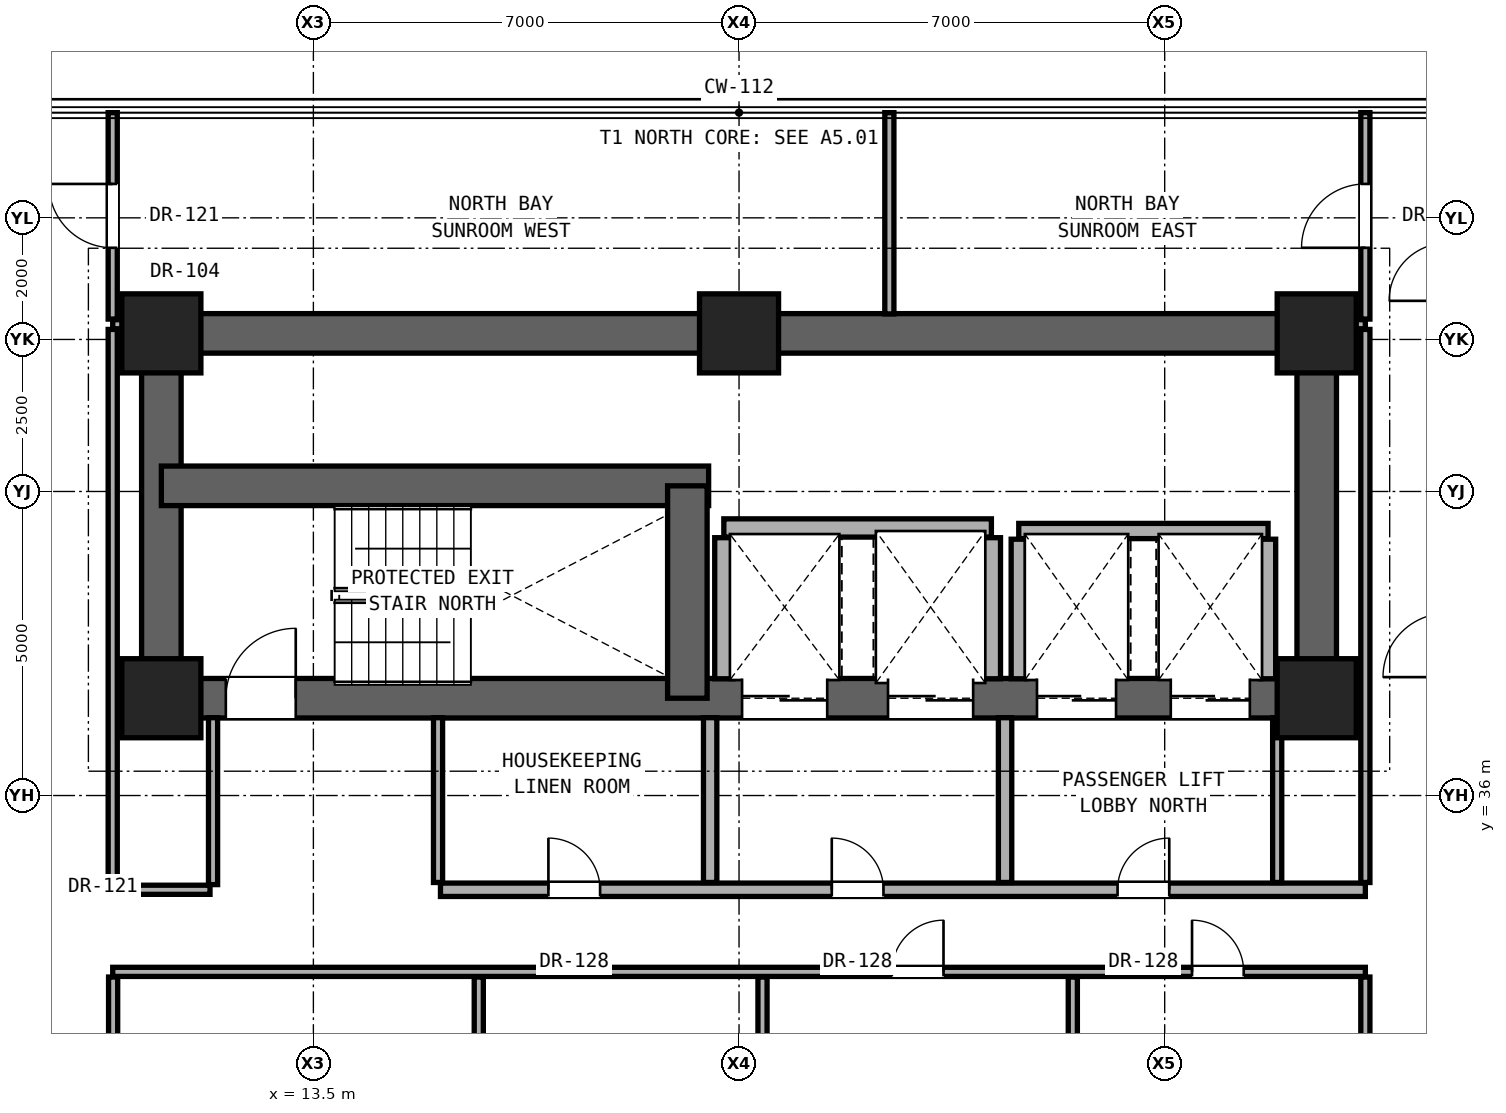
"""IFC4 building model, lengths in metres.
Left out: names, types, materials, properties, quantities, classifications, styles, units other than length and angle.
Written with IfcOpenShell. Run it as: python <this file> out.ifc"""

import sys

from ifc_helpers import new_model, si_unit, direction, frame, frame_2d, origin, origin_2d, place, context, subcontext, project, spatial, rectangle, extrude, element, fill, save


model = new_model("IFC4")
c1 = context("Model", 3, precision=1e-05, world=origin(), true_north=direction((0.0, 1.0)))
c2 = subcontext(c1, "Body", "Model", "MODEL_VIEW")
j1 = project(units=[si_unit("LENGTHUNIT", "METRE"), si_unit("PLANEANGLEUNIT", "RADIAN")], contexts=[c1])
p1 = place(None, origin())
s1 = spatial("IfcSite", under=j1, at=p1, CompositionType="ELEMENT")
p2 = place(p1, origin())
s2 = spatial("IfcBuilding", under=s1, at=p2, CompositionType="ELEMENT")
p3 = place(p2, frame((0.0, 0.0, 68.6)))
s3 = spatial("IfcBuildingStorey", under=s2, at=p3, CompositionType="ELEMENT", Elevation=68.6)
for number, where, z_axis, x_axis in (
    (1, (11.0, 37.6, 0.0), (0.0, 0.0, 1.0), (1.0, 0.0, 0.0)),
    (2, (30.0, 37.6, 0.0), (0.0, 0.0, 1.0), (1.0, 0.0, 0.0)),
    (3, (11.0, 43.6, 0.0), (0.0, 0.0, 1.0), (1.0, 0.0, 0.0)),
    (4, (20.5, 43.6, 0.0), (0.0, 0.0, 1.0), (1.0, 0.0, 0.0)),
    (5, (30.0, 43.6, 0.0), (0.0, 0.0, 1.0), (1.0, 0.0, 0.0)),
):
    element("IfcColumn", number, at=place(p3, frame(where, z_axis=z_axis, x_axis=x_axis)), inside=s3, PredefinedType="COLUMN", context=c2, shape_type="SweptSolid", body=[
        extrude(rectangle(XDim=1.3, YDim=1.3, at=origin_2d()), origin(), (0.0, 0.0, 1.0), 3.3),
    ])
p4 = place(p3, frame((11.0, 43.6, 0.0), z_axis=(0.0, 0.0, 1.0), x_axis=(1.0, 0.0, 0.0)))
e6 = element("IfcWall", 6, at=p4, inside=s3, PredefinedType="SHEAR", context=c2, shape_type="SweptSolid", body=[
    extrude(rectangle(XDim=19.0, YDim=0.65, at=frame_2d((9.5, 0.0))), origin(), (0.0, 0.0, 1.0), 3.06),
])
for number, where, z_axis, x_axis in (
    (7, (11.0, 37.6, 0.0), (0.0, 0.0, 1.0), (0.0, 1.0, 0.0)),
    (8, (30.0, 37.6, 0.0), (0.0, 0.0, 1.0), (0.0, 1.0, 0.0)),
):
    element("IfcWall", number, at=place(p3, frame(where, z_axis=z_axis, x_axis=x_axis)), inside=s3, PredefinedType="SHEAR", context=c2, shape_type="SweptSolid", body=[
        extrude(rectangle(XDim=6.0, YDim=0.65, at=frame_2d((3.0, 0.0))), origin(), (0.0, 0.0, 1.0), 3.06),
    ])
p5 = place(p3, frame((11.0, 37.6, 0.0), z_axis=(0.0, 0.0, 1.0), x_axis=(1.0, 0.0, 0.0)))
e9 = element("IfcWall", 9, at=p5, inside=s3, PredefinedType="SHEAR", context=c2, shape_type="SweptSolid", body=[
    extrude(rectangle(XDim=19.0, YDim=0.65, at=frame_2d((9.5, 0.0))), origin(), (0.0, 0.0, 1.0), 3.06),
])
p6 = place(p5, frame((1.06, 0.0, 0.0)))
e10 = element("IfcOpeningElement", 10, at=p6, cuts=e9, PredefinedType="OPENING", context=c2, shape_type="SweptSolid", body=[
    extrude(rectangle(XDim=1.15, YDim=2.2, at=frame_2d((0.575, 1.1))), frame((0.0, 0.335, 0.0), z_axis=(0.0, -1.0, 0.0), x_axis=(1.0, 0.0, 0.0)), (0.0, 0.0, 1.0), 0.67),
])
p7 = place(p5, frame((9.55, 0.0, 0.0)))
e11 = element("IfcOpeningElement", 11, at=p7, cuts=e9, PredefinedType="OPENING", context=c2, shape_type="SweptSolid", body=[
    extrude(rectangle(XDim=1.4, YDim=2.35, at=frame_2d((0.7, 1.175))), frame((0.0, 0.335, 0.0), z_axis=(0.0, -1.0, 0.0), x_axis=(1.0, 0.0, 0.0)), (0.0, 0.0, 1.0), 0.67),
])
p8 = place(p5, frame((11.95, 0.0, 0.0)))
e12 = element("IfcOpeningElement", 12, at=p8, cuts=e9, PredefinedType="OPENING", context=c2, shape_type="SweptSolid", body=[
    extrude(rectangle(XDim=1.4, YDim=2.35, at=frame_2d((0.7, 1.175))), frame((0.0, 0.335, 0.0), z_axis=(0.0, -1.0, 0.0), x_axis=(1.0, 0.0, 0.0)), (0.0, 0.0, 1.0), 0.67),
])
p9 = place(p5, frame((14.4, 0.0, 0.0)))
e13 = element("IfcOpeningElement", 13, at=p9, cuts=e9, PredefinedType="OPENING", context=c2, shape_type="SweptSolid", body=[
    extrude(rectangle(XDim=1.3, YDim=2.3, at=frame_2d((0.65, 1.15))), frame((0.0, 0.335, 0.0), z_axis=(0.0, -1.0, 0.0), x_axis=(1.0, 0.0, 0.0)), (0.0, 0.0, 1.0), 0.67),
])
p10 = place(p5, frame((16.6, 0.0, 0.0)))
e14 = element("IfcOpeningElement", 14, at=p10, cuts=e9, PredefinedType="OPENING", context=c2, shape_type="SweptSolid", body=[
    extrude(rectangle(XDim=1.3, YDim=2.3, at=frame_2d((0.65, 1.15))), frame((0.0, 0.335, 0.0), z_axis=(0.0, -1.0, 0.0), x_axis=(1.0, 0.0, 0.0)), (0.0, 0.0, 1.0), 0.67),
])
p11 = place(p3, frame((11.0, 41.093, 0.0), z_axis=(0.0, 0.0, 1.0), x_axis=(1.0, 0.0, 0.0)))
e15 = element("IfcWall", 15, at=p11, inside=s3, PredefinedType="SHEAR", context=c2, shape_type="SweptSolid", body=[
    extrude(rectangle(XDim=9.0, YDim=0.65, at=frame_2d((4.5, 0.0))), origin(), (0.0, 0.0, 1.0), 3.06),
])
p12 = place(p3, frame((19.65, 37.6, 0.0), z_axis=(0.0, 0.0, 1.0), x_axis=(0.0, 1.0, 0.0)))
e16 = element("IfcWall", 16, at=p12, inside=s3, PredefinedType="SHEAR", context=c2, shape_type="SweptSolid", body=[
    extrude(rectangle(XDim=3.493, YDim=0.65, at=frame_2d((1.747, 0.0))), origin(), (0.0, 0.0, 1.0), 3.06),
])
p13 = place(p3, frame((10.2, 33.1, 0.0), z_axis=(0.0, 0.0, 1.0), x_axis=(1.0, 0.0, 0.0)))
e17 = element("IfcWall", 17, at=p13, inside=s3, PredefinedType="PARTITIONING", context=c2, shape_type="SweptSolid", body=[
    extrude(rectangle(XDim=20.6, YDim=0.15, at=frame_2d((10.3, 0.0))), origin(), (0.0, 0.0, 1.0), 2.104),
])
p14 = place(p13, frame((12.812, 0.0, 0.0)))
e18 = element("IfcOpeningElement", 18, at=p14, cuts=e17, PredefinedType="OPENING", context=c2, shape_type="SweptSolid", body=[
    extrude(rectangle(XDim=0.85, YDim=2.01, at=frame_2d((0.425, 1.005))), frame((0.0, 0.085, 0.0), z_axis=(0.0, -1.0, 0.0), x_axis=(1.0, 0.0, 0.0)), (0.0, 0.0, 1.0), 0.17),
])
p15 = place(p13, frame((17.75, 0.0, 0.0)))
e19 = element("IfcOpeningElement", 19, at=p15, cuts=e17, PredefinedType="OPENING", context=c2, shape_type="SweptSolid", body=[
    extrude(rectangle(XDim=0.85, YDim=2.01, at=frame_2d((0.425, 1.005))), frame((0.0, 0.085, 0.0), z_axis=(0.0, -1.0, 0.0), x_axis=(1.0, 0.0, 0.0)), (0.0, 0.0, 1.0), 0.17),
])
p16 = place(p3, frame((10.2, 34.45, 0.0), z_axis=(0.0, 0.0, 1.0), x_axis=(1.0, 0.0, 0.0)))
e20 = element("IfcWall", 20, at=p16, inside=s3, PredefinedType="PARTITIONING", context=c2, shape_type="SweptSolid", body=[
    extrude(rectangle(XDim=1.6, YDim=0.15, at=frame_2d((0.8, 0.0))), origin(), (0.0, 0.0, 1.0), 2.104),
])
p17 = place(p3, frame((15.59, 34.45, 0.0), z_axis=(0.0, 0.0, 1.0), x_axis=(1.0, 0.0, 0.0)))
e21 = element("IfcWall", 21, at=p17, inside=s3, PredefinedType="SOLIDWALL", context=c2, shape_type="SweptSolid", body=[
    extrude(rectangle(XDim=15.21, YDim=0.22, at=frame_2d((7.605, 0.0))), origin(), (0.0, 0.0, 1.0), 2.104),
])
p18 = place(p17, frame((6.435, 0.0, 0.0)))
e22 = element("IfcOpeningElement", 22, at=p18, cuts=e21, PredefinedType="OPENING", context=c2, shape_type="SweptSolid", body=[
    extrude(rectangle(XDim=0.85, YDim=2.01, at=frame_2d((0.425, 1.005))), frame((0.0, 0.12, 0.0), z_axis=(0.0, -1.0, 0.0), x_axis=(1.0, 0.0, 0.0)), (0.0, 0.0, 1.0), 0.24),
])
p19 = place(p17, frame((11.135, 0.0, 0.0)))
e23 = element("IfcOpeningElement", 23, at=p19, cuts=e21, PredefinedType="OPENING", context=c2, shape_type="SweptSolid", body=[
    extrude(rectangle(XDim=0.85, YDim=2.01, at=frame_2d((0.425, 1.005))), frame((0.0, 0.12, 0.0), z_axis=(0.0, -1.0, 0.0), x_axis=(1.0, 0.0, 0.0)), (0.0, 0.0, 1.0), 0.24),
])
p20 = place(p17, frame((1.775, 0.0, 0.0)))
e24 = element("IfcOpeningElement", 24, at=p20, cuts=e21, PredefinedType="OPENING", context=c2, shape_type="SweptSolid", body=[
    extrude(rectangle(XDim=0.85, YDim=2.01, at=frame_2d((0.425, 1.005))), frame((0.0, 0.12, 0.0), z_axis=(0.0, -1.0, 0.0), x_axis=(1.0, 0.0, 0.0)), (0.0, 0.0, 1.0), 0.24),
])
p21 = place(p3, frame((25.1, 40.35, 0.0), z_axis=(0.0, 0.0, 1.0), x_axis=(1.0, 0.0, 0.0)))
e25 = element("IfcWall", 25, at=p21, inside=s3, PredefinedType="SOLIDWALL", context=c2, shape_type="SweptSolid", body=[
    extrude(rectangle(XDim=4.1, YDim=0.25, at=frame_2d((2.05, 0.0))), origin(), (0.0, 0.0, 1.0), 3.06),
])
p22 = place(p3, frame((20.25, 40.4, 0.0), z_axis=(0.0, 0.0, 1.0), x_axis=(1.0, 0.0, 0.0)))
e26 = element("IfcWall", 26, at=p22, inside=s3, PredefinedType="SOLIDWALL", context=c2, shape_type="SweptSolid", body=[
    extrude(rectangle(XDim=4.4, YDim=0.3, at=frame_2d((2.2, 0.0))), origin(), (0.0, 0.0, 1.0), 3.06),
])
for number, where, z_axis, x_axis in (
    (27, (10.2, 43.75, 0.0), (0.0, 0.0, 1.0), (1.0, 0.0, 0.0)),
    (28, (30.32, 43.75, 0.0), (0.0, 0.0, 1.0), (1.0, 0.0, 0.0)),
):
    element("IfcWall", number, at=place(p3, frame(where, z_axis=z_axis, x_axis=x_axis)), inside=s3, PredefinedType="PARTITIONING", context=c2, shape_type="SweptSolid", body=[
        extrude(rectangle(XDim=0.48, YDim=0.15, at=frame_2d((0.24, 0.0))), origin(), (0.0, 0.0, 1.0), 3.06),
    ])
p23 = place(p3, frame((10.207, 22.935, 0.0), z_axis=(0.0, 0.0, 1.0), x_axis=(0.0, 1.0, 0.0)))
e29 = element("IfcWall", 29, at=p23, inside=s3, PredefinedType="PARTITIONING", context=c2, shape_type="SweptSolid", body=[
    extrude(rectangle(XDim=10.08, YDim=0.15, at=frame_2d((5.04, 0.0))), origin(), (0.0, 0.0, 1.0), 2.279),
])
p24 = place(p23, frame((4.565, 0.0, 0.0)))
e30 = element("IfcOpeningElement", 30, at=p24, cuts=e29, PredefinedType="OPENING", context=c2, shape_type="SweptSolid", body=[
    extrude(rectangle(XDim=0.95, YDim=2.15, at=frame_2d((0.475, 1.075))), frame((0.0, 0.085, 0.0), z_axis=(0.0, -1.0, 0.0), x_axis=(1.0, 0.0, 0.0)), (0.0, 0.0, 1.0), 0.17),
])
p25 = place(p3, frame((10.2, 34.535, 0.0), z_axis=(0.0, 0.0, 1.0), x_axis=(0.0, 1.0, 0.0)))
e31 = element("IfcWall", 31, at=p25, inside=s3, PredefinedType="PARTITIONING", context=c2, shape_type="SweptSolid", body=[
    extrude(rectangle(XDim=9.13, YDim=0.15, at=frame_2d((4.565, 0.0))), origin(), (0.0, 0.0, 1.0), 2.436),
])
p26 = place(p3, frame((10.2, 43.835, 0.0), z_axis=(0.0, 0.0, 1.0), x_axis=(0.0, 1.0, 0.0)))
e32 = element("IfcWall", 32, at=p26, inside=s3, PredefinedType="PARTITIONING", context=c2, shape_type="SweptSolid", body=[
    extrude(rectangle(XDim=3.395, YDim=0.15, at=frame_2d((1.698, 0.0))), origin(), (0.0, 0.0, 1.0), 3.06),
])
p27 = place(p26, frame((1.173, 0.0, 0.0)))
e33 = element("IfcOpeningElement", 33, at=p27, cuts=e32, PredefinedType="OPENING", context=c2, shape_type="SweptSolid", body=[
    extrude(rectangle(XDim=1.05, YDim=2.2, at=frame_2d((0.525, 1.1))), frame((0.0, 0.085, 0.0), z_axis=(0.0, -1.0, 0.0), x_axis=(1.0, 0.0, 0.0)), (0.0, 0.0, 1.0), 0.17),
])
p28 = place(p3, frame((11.85, 34.535, 0.0), z_axis=(0.0, 0.0, 1.0), x_axis=(0.0, 1.0, 0.0)))
e34 = element("IfcWall", 34, at=p28, inside=s3, PredefinedType="PARTITIONING", context=c2, shape_type="SweptSolid", body=[
    extrude(rectangle(XDim=2.745, YDim=0.15, at=frame_2d((1.373, 0.0))), origin(), (0.0, 0.0, 1.0), 3.06),
])
p29 = place(p3, frame((15.55, 34.57, 0.0), z_axis=(0.0, 0.0, 1.0), x_axis=(0.0, 1.0, 0.0)))
e35 = element("IfcWall", 35, at=p29, inside=s3, PredefinedType="PARTITIONING", context=c2, shape_type="SweptSolid", body=[
    extrude(rectangle(XDim=2.71, YDim=0.15, at=frame_2d((1.355, 0.0))), origin(), (0.0, 0.0, 1.0), 2.589),
])
p30 = place(p3, frame((16.22, 22.935, 0.0), z_axis=(0.0, 0.0, 1.0), x_axis=(0.0, 1.0, 0.0)))
e36 = element("IfcWall", 36, at=p30, inside=s3, PredefinedType="PARTITIONING", context=c2, shape_type="SweptSolid", body=[
    extrude(rectangle(XDim=10.08, YDim=0.15, at=frame_2d((5.04, 0.0))), origin(), (0.0, 0.0, 1.0), 2.104),
])
p31 = place(p3, frame((20.025, 34.57, 0.0), z_axis=(0.0, 0.0, 1.0), x_axis=(0.0, 1.0, 0.0)))
e37 = element("IfcWall", 37, at=p31, inside=s3, PredefinedType="SOLIDWALL", context=c2, shape_type="SweptSolid", body=[
    extrude(rectangle(XDim=2.71, YDim=0.22, at=frame_2d((1.355, 0.0))), origin(), (0.0, 0.0, 1.0), 3.06),
])
p32 = place(p3, frame((20.25, 37.92, 0.0), z_axis=(0.0, 0.0, 1.0), x_axis=(0.0, 1.0, 0.0)))
e38 = element("IfcWall", 38, at=p32, inside=s3, PredefinedType="SOLIDWALL", context=c2, shape_type="SweptSolid", body=[
    extrude(rectangle(XDim=2.32, YDim=0.3, at=frame_2d((1.16, 0.0))), origin(), (0.0, 0.0, 1.0), 3.06),
])
p33 = place(p3, frame((20.886, 19.985, 0.0), z_axis=(0.0, 0.0, 1.0), x_axis=(0.0, 1.0, 0.0)))
e39 = element("IfcWall", 39, at=p33, inside=s3, PredefinedType="PARTITIONING", context=c2, shape_type="SweptSolid", body=[
    extrude(rectangle(XDim=13.03, YDim=0.15, at=frame_2d((6.515, 0.0))), origin(), (0.0, 0.0, 1.0), 2.104),
])
p34 = place(p3, frame((22.972, 43.92, 0.0), z_axis=(0.0, 0.0, 1.0), x_axis=(0.0, 1.0, 0.0)))
e40 = element("IfcWall", 40, at=p34, inside=s3, PredefinedType="PARTITIONING", context=c2, shape_type="SweptSolid", body=[
    extrude(rectangle(XDim=3.31, YDim=0.15, at=frame_2d((1.655, 0.0))), origin(), (0.0, 0.0, 1.0), 3.06),
])
p35 = place(p3, frame((24.65, 37.92, 0.0), z_axis=(0.0, 0.0, 1.0), x_axis=(0.0, 1.0, 0.0)))
e41 = element("IfcWall", 41, at=p35, inside=s3, PredefinedType="SOLIDWALL", context=c2, shape_type="SweptSolid", body=[
    extrude(rectangle(XDim=2.32, YDim=0.3, at=frame_2d((1.16, 0.0))), origin(), (0.0, 0.0, 1.0), 3.06),
])
p36 = place(p3, frame((24.875, 34.57, 0.0), z_axis=(0.0, 0.0, 1.0), x_axis=(0.0, 1.0, 0.0)))
e42 = element("IfcWall", 42, at=p36, inside=s3, PredefinedType="SOLIDWALL", context=c2, shape_type="SweptSolid", body=[
    extrude(rectangle(XDim=2.71, YDim=0.22, at=frame_2d((1.355, 0.0))), origin(), (0.0, 0.0, 1.0), 3.06),
])
p37 = place(p3, frame((25.1, 37.92, 0.0), z_axis=(0.0, 0.0, 1.0), x_axis=(0.0, 1.0, 0.0)))
e43 = element("IfcWall", 43, at=p37, inside=s3, PredefinedType="SOLIDWALL", context=c2, shape_type="SweptSolid", body=[
    extrude(rectangle(XDim=2.295, YDim=0.25, at=frame_2d((1.147, 0.0))), origin(), (0.0, 0.0, 1.0), 3.06),
])
p38 = place(p3, frame((25.989, 19.985, 0.0), z_axis=(0.0, 0.0, 1.0), x_axis=(0.0, 1.0, 0.0)))
e44 = element("IfcWall", 44, at=p38, inside=s3, PredefinedType="PARTITIONING", context=c2, shape_type="SweptSolid", body=[
    extrude(rectangle(XDim=13.03, YDim=0.15, at=frame_2d((6.515, 0.0))), origin(), (0.0, 0.0, 1.0), 2.104),
])
p39 = place(p3, frame((29.35, 34.57, 0.0), z_axis=(0.0, 0.0, 1.0), x_axis=(0.0, 1.0, 0.0)))
e45 = element("IfcWall", 45, at=p39, inside=s3, PredefinedType="PARTITIONING", context=c2, shape_type="SweptSolid", body=[
    extrude(rectangle(XDim=2.71, YDim=0.15, at=frame_2d((1.355, 0.0))), origin(), (0.0, 0.0, 1.0), 3.06),
])
p40 = place(p3, frame((29.2, 37.92, 0.0), z_axis=(0.0, 0.0, 1.0), x_axis=(0.0, 1.0, 0.0)))
e46 = element("IfcWall", 46, at=p40, inside=s3, PredefinedType="SOLIDWALL", context=c2, shape_type="SweptSolid", body=[
    extrude(rectangle(XDim=2.295, YDim=0.25, at=frame_2d((1.147, 0.0))), origin(), (0.0, 0.0, 1.0), 3.06),
])
p41 = place(p3, frame((30.8, 19.985, 0.0), z_axis=(0.0, 0.0, 1.0), x_axis=(0.0, 1.0, 0.0)))
e47 = element("IfcWall", 47, at=p41, inside=s3, PredefinedType="PARTITIONING", context=c2, shape_type="SweptSolid", body=[
    extrude(rectangle(XDim=13.03, YDim=0.15, at=frame_2d((6.515, 0.0))), origin(), (0.0, 0.0, 1.0), 2.279),
])
p42 = place(p3, frame((30.8, 34.57, 0.0), z_axis=(0.0, 0.0, 1.0), x_axis=(0.0, 1.0, 0.0)))
e48 = element("IfcWall", 48, at=p42, inside=s3, PredefinedType="PARTITIONING", context=c2, shape_type="SweptSolid", body=[
    extrude(rectangle(XDim=9.095, YDim=0.15, at=frame_2d((4.547, 0.0))), origin(), (0.0, 0.0, 1.0), 2.436),
])
p43 = place(p3, frame((30.8, 43.835, 0.0), z_axis=(0.0, 0.0, 1.0), x_axis=(0.0, 1.0, 0.0)))
e49 = element("IfcWall", 49, at=p43, inside=s3, PredefinedType="PARTITIONING", context=c2, shape_type="SweptSolid", body=[
    extrude(rectangle(XDim=3.395, YDim=0.15, at=frame_2d((1.698, 0.0))), origin(), (0.0, 0.0, 1.0), 3.06),
])
p44 = place(p43, frame((1.173, 0.0, 0.0)))
e50 = element("IfcOpeningElement", 50, at=p44, cuts=e49, PredefinedType="OPENING", context=c2, shape_type="SweptSolid", body=[
    extrude(rectangle(XDim=1.05, YDim=2.2, at=frame_2d((0.525, 1.1))), frame((0.0, 0.085, 0.0), z_axis=(0.0, -1.0, 0.0), x_axis=(1.0, 0.0, 0.0)), (0.0, 0.0, 1.0), 0.17),
])
p45 = place(p6, origin())
e51 = element("IfcDoor", 51, at=p45, inside=s3, OperationType="SINGLE_SWING_RIGHT", PredefinedType="DOOR", context=c2, shape_type="SweptSolid", body=[
    extrude(rectangle(XDim=1.15, YDim=2.2, at=frame_2d((0.575, 1.1))), frame((0.0, 0.025, 0.0), z_axis=(0.0, -1.0, 0.0), x_axis=(1.0, 0.0, 0.0)), (0.0, 0.0, 1.0), 0.05),
])
fill(e10, e51)
p46 = place(p18, origin())
e52 = element("IfcDoor", 52, at=p46, inside=s3, OperationType="SINGLE_SWING_LEFT", PredefinedType="DOOR", context=c2, shape_type="SweptSolid", body=[
    extrude(rectangle(XDim=0.85, YDim=2.01, at=frame_2d((0.425, 1.005))), frame((0.0, 0.025, 0.0), z_axis=(0.0, -1.0, 0.0), x_axis=(1.0, 0.0, 0.0)), (0.0, 0.0, 1.0), 0.05),
])
fill(e22, e52)
p47 = place(p19, origin())
e53 = element("IfcDoor", 53, at=p47, inside=s3, OperationType="SINGLE_SWING_RIGHT", PredefinedType="DOOR", context=c2, shape_type="SweptSolid", body=[
    extrude(rectangle(XDim=0.85, YDim=2.01, at=frame_2d((0.425, 1.005))), frame((0.0, 0.025, 0.0), z_axis=(0.0, -1.0, 0.0), x_axis=(1.0, 0.0, 0.0)), (0.0, 0.0, 1.0), 0.05),
])
fill(e23, e53)
p48 = place(p20, origin())
e54 = element("IfcDoor", 54, at=p48, inside=s3, OperationType="SINGLE_SWING_LEFT", PredefinedType="DOOR", context=c2, shape_type="SweptSolid", body=[
    extrude(rectangle(XDim=0.85, YDim=2.01, at=frame_2d((0.425, 1.005))), frame((0.0, 0.025, 0.0), z_axis=(0.0, -1.0, 0.0), x_axis=(1.0, 0.0, 0.0)), (0.0, 0.0, 1.0), 0.05),
])
fill(e24, e54)
p49 = place(p14, origin())
e55 = element("IfcDoor", 55, at=p49, inside=s3, OperationType="SINGLE_SWING_RIGHT", PredefinedType="DOOR", context=c2, shape_type="SweptSolid", body=[
    extrude(rectangle(XDim=0.85, YDim=2.01, at=frame_2d((0.425, 1.005))), frame((0.0, 0.025, 0.0), z_axis=(0.0, -1.0, 0.0), x_axis=(1.0, 0.0, 0.0)), (0.0, 0.0, 1.0), 0.05),
])
fill(e18, e55)
p50 = place(p15, origin())
e56 = element("IfcDoor", 56, at=p50, inside=s3, OperationType="SINGLE_SWING_LEFT", PredefinedType="DOOR", context=c2, shape_type="SweptSolid", body=[
    extrude(rectangle(XDim=0.85, YDim=2.01, at=frame_2d((0.425, 1.005))), frame((0.0, 0.025, 0.0), z_axis=(0.0, -1.0, 0.0), x_axis=(1.0, 0.0, 0.0)), (0.0, 0.0, 1.0), 0.05),
])
fill(e19, e56)
p51 = place(p27, origin())
e57 = element("IfcDoor", 57, at=p51, inside=s3, OperationType="SINGLE_SWING_RIGHT", PredefinedType="DOOR", context=c2, shape_type="SweptSolid", body=[
    extrude(rectangle(XDim=1.05, YDim=2.2, at=frame_2d((0.525, 1.1))), frame((0.0, 0.025, 0.0), z_axis=(0.0, -1.0, 0.0), x_axis=(1.0, 0.0, 0.0)), (0.0, 0.0, 1.0), 0.05),
])
fill(e33, e57)
p52 = place(p44, origin())
e58 = element("IfcDoor", 58, at=p52, inside=s3, OperationType="SINGLE_SWING_LEFT", PredefinedType="DOOR", context=c2, shape_type="SweptSolid", body=[
    extrude(rectangle(XDim=1.05, YDim=2.2, at=frame_2d((0.525, 1.1))), frame((0.0, 0.025, 0.0), z_axis=(0.0, -1.0, 0.0), x_axis=(1.0, 0.0, 0.0)), (0.0, 0.0, 1.0), 0.05),
])
fill(e50, e58)
p53 = place(p7, origin())
e59 = element("IfcDoor", 59, at=p53, inside=s3, OperationType="DOUBLE_DOOR_SLIDING", PredefinedType="DOOR", context=c2, shape_type="SweptSolid", body=[
    extrude(rectangle(XDim=1.4, YDim=2.35, at=frame_2d((0.7, 1.175))), frame((0.0, 0.025, 0.0), z_axis=(0.0, -1.0, 0.0), x_axis=(1.0, 0.0, 0.0)), (0.0, 0.0, 1.0), 0.05),
])
fill(e11, e59)
p54 = place(p8, origin())
e60 = element("IfcDoor", 60, at=p54, inside=s3, OperationType="DOUBLE_DOOR_SLIDING", PredefinedType="DOOR", context=c2, shape_type="SweptSolid", body=[
    extrude(rectangle(XDim=1.4, YDim=2.35, at=frame_2d((0.7, 1.175))), frame((0.0, 0.025, 0.0), z_axis=(0.0, -1.0, 0.0), x_axis=(1.0, 0.0, 0.0)), (0.0, 0.0, 1.0), 0.05),
])
fill(e12, e60)
p55 = place(p9, origin())
e61 = element("IfcDoor", 61, at=p55, inside=s3, OperationType="DOUBLE_DOOR_SLIDING", PredefinedType="DOOR", context=c2, shape_type="SweptSolid", body=[
    extrude(rectangle(XDim=1.3, YDim=2.3, at=frame_2d((0.65, 1.15))), frame((0.0, 0.025, 0.0), z_axis=(0.0, -1.0, 0.0), x_axis=(1.0, 0.0, 0.0)), (0.0, 0.0, 1.0), 0.05),
])
fill(e13, e61)
p56 = place(p10, origin())
e62 = element("IfcDoor", 62, at=p56, inside=s3, OperationType="DOUBLE_DOOR_SLIDING", PredefinedType="DOOR", context=c2, shape_type="SweptSolid", body=[
    extrude(rectangle(XDim=1.3, YDim=2.3, at=frame_2d((0.65, 1.15))), frame((0.0, 0.025, 0.0), z_axis=(0.0, -1.0, 0.0), x_axis=(1.0, 0.0, 0.0)), (0.0, 0.0, 1.0), 0.05),
])
fill(e14, e62)
save(model, sys.argv[1])
